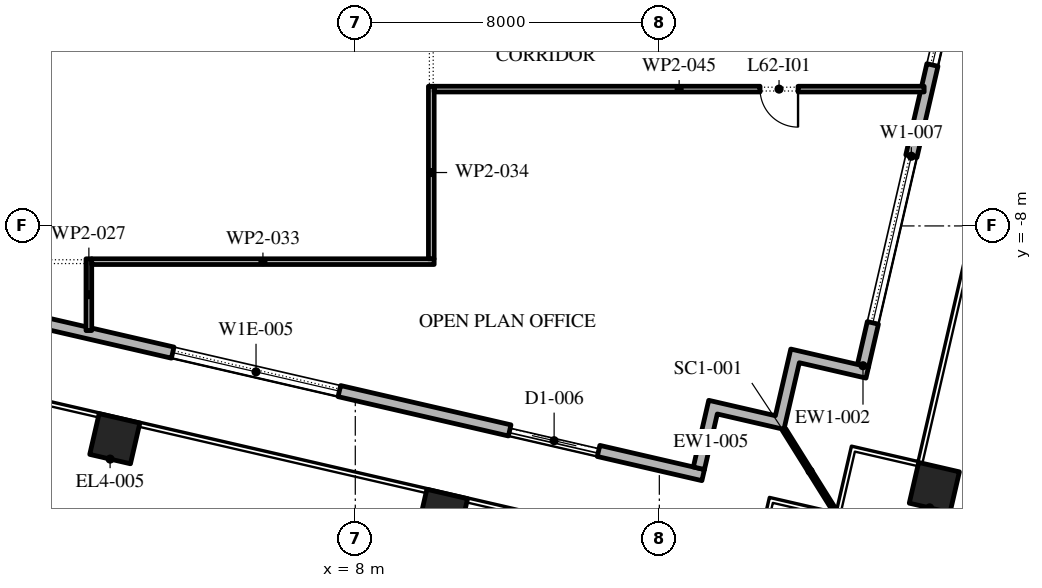
"""IFC4 building model, lengths in metres.
Left out: names, types, materials, properties, quantities, classifications, styles, units other than length and angle.
Written with IfcOpenShell. Run it as: python <this file> out.ifc"""

import sys

from ifc_helpers import new_model, si_unit, direction, frame, frame_2d, origin, origin_2d, place, context, subcontext, project, spatial, polyline, rectangle, outline, extrude, element, fill, save


model = new_model("IFC4")
c1 = context("Model", 3, precision=1e-05, world=origin(), true_north=direction((0.0, 1.0)))
c2 = subcontext(c1, "Body", "Model", "MODEL_VIEW")
j1 = project(units=[si_unit("LENGTHUNIT", "METRE"), si_unit("PLANEANGLEUNIT", "RADIAN")], contexts=[c1])
p1 = place(None, origin())
s1 = spatial("IfcSite", under=j1, at=p1, CompositionType="ELEMENT")
p2 = place(p1, origin())
s2 = spatial("IfcBuilding", under=s1, at=p2, CompositionType="ELEMENT")
p3 = place(p2, frame((0.0, 0.0, 285.0)))
s3 = spatial("IfcBuildingStorey", under=s2, at=p3, CompositionType="ELEMENT", Elevation=285.0)
for number, where, z_axis, x_axis in (
    (1, (1.672, -13.599, 0.0), (0.0, 0.0, 1.0), (0.974, -0.225, 0.0)),
    (2, (10.295, -15.59, 0.0), (0.0, 0.0, 1.0), (0.974, -0.225, 0.0)),
    (3, (23.236, -14.883, 0.0), (0.0, 0.0, 1.0), (0.974, -0.225, 0.0)),
):
    element("IfcColumn", number, at=place(p3, frame(where, z_axis=z_axis, x_axis=x_axis)), inside=s3, PredefinedType="COLUMN", context=c2, shape_type="SweptSolid", body=[
        extrude(rectangle(XDim=1.1, YDim=1.1, at=origin_2d()), origin(), (0.0, 0.0, 1.0), 4.2),
    ])
p4 = place(p3, frame((-29.616, -3.758, 0.0), z_axis=(0.0, 0.0, 1.0), x_axis=(0.974370532314, -0.224949029246, 0.0)))
e4 = element("IfcWall", 4, at=p4, inside=s3, PredefinedType="STANDARD", context=c2, shape_type="SweptSolid", body=[
    extrude(rectangle(XDim=48.0, YDim=0.3, at=frame_2d((24.0, 0.0))), origin(), (0.0, 0.0, 1.0), 4.0),
])
p5 = place(p4, frame((1.625, 0.0, 0.45)))
e5 = element("IfcOpeningElement", 5, at=p5, cuts=e4, PredefinedType="OPENING", context=c2, shape_type="SweptSolid", body=[
    extrude(rectangle(XDim=4.5, YDim=3.05, at=frame_2d((2.25, 1.525))), frame((0.0, 0.16, 0.0), z_axis=(0.0, -1.0, 0.0), x_axis=(1.0, 0.0, 0.0)), (0.0, 0.0, 1.0), 0.32),
])
p6 = place(p4, frame((10.575, 0.0, 0.0)))
e6 = element("IfcOpeningElement", 6, at=p6, cuts=e4, PredefinedType="OPENING", context=c2, shape_type="SweptSolid", body=[
    extrude(rectangle(XDim=2.4, YDim=3.5, at=frame_2d((1.2, 1.75))), frame((0.0, 0.16, 0.0), z_axis=(0.0, -1.0, 0.0), x_axis=(1.0, 0.0, 0.0)), (0.0, 0.0, 1.0), 0.32),
])
p7 = place(p4, frame((17.575, 0.0, 0.45)))
e7 = element("IfcOpeningElement", 7, at=p7, cuts=e4, PredefinedType="OPENING", context=c2, shape_type="SweptSolid", body=[
    extrude(rectangle(XDim=4.5, YDim=3.0, at=frame_2d((2.25, 1.5))), frame((0.0, 0.16, 0.0), z_axis=(0.0, -1.0, 0.0), x_axis=(1.0, 0.0, 0.0)), (0.0, 0.0, 1.0), 0.32),
])
p8 = place(p4, frame((25.625, 0.0, 0.45)))
e8 = element("IfcOpeningElement", 8, at=p8, cuts=e4, PredefinedType="OPENING", context=c2, shape_type="SweptSolid", body=[
    extrude(rectangle(XDim=4.5, YDim=2.95, at=frame_2d((2.25, 1.475))), frame((0.0, 0.16, 0.0), z_axis=(0.0, -1.0, 0.0), x_axis=(1.0, 0.0, 0.0)), (0.0, 0.0, 1.0), 0.32),
])
p9 = place(p4, frame((33.675, 0.0, 0.45)))
e9 = element("IfcOpeningElement", 9, at=p9, cuts=e4, PredefinedType="OPENING", context=c2, shape_type="SweptSolid", body=[
    extrude(rectangle(XDim=4.5, YDim=2.825, at=frame_2d((2.25, 1.413))), frame((0.0, 0.16, 0.0), z_axis=(0.0, -1.0, 0.0), x_axis=(1.0, 0.0, 0.0)), (0.0, 0.0, 1.0), 0.32),
])
p10 = place(p4, frame((42.775, 0.0, 0.0)))
e10 = element("IfcOpeningElement", 10, at=p10, cuts=e4, PredefinedType="OPENING", context=c2, shape_type="SweptSolid", body=[
    extrude(rectangle(XDim=2.4, YDim=3.5, at=frame_2d((1.2, 1.75))), frame((0.0, 0.16, 0.0), z_axis=(0.0, -1.0, 0.0), x_axis=(1.0, 0.0, 0.0)), (0.0, 0.0, 1.0), 0.32),
])
p11 = place(p3, frame((21.359, -11.678, 0.0), z_axis=(0.0, 0.0, 1.0), x_axis=(0.224949198343, 0.974370493275, 0.0)))
e11 = element("IfcWall", 11, at=p11, inside=s3, PredefinedType="STANDARD", context=c2, shape_type="SweptSolid", body=[
    extrude(rectangle(XDim=49.5, YDim=0.3, at=frame_2d((24.75, 0.0))), origin(), (0.0, 0.0, 1.0), 4.0),
])
p12 = place(p11, frame((1.157, 0.0, 0.45)))
e12 = element("IfcOpeningElement", 12, at=p12, cuts=e11, PredefinedType="OPENING", context=c2, shape_type="SweptSolid", body=[
    extrude(rectangle(XDim=4.5, YDim=3.05, at=frame_2d((2.25, 1.525))), frame((0.0, 0.16, 0.0), z_axis=(0.0, -1.0, 0.0), x_axis=(1.0, 0.0, 0.0)), (0.0, 0.0, 1.0), 0.32),
])
p13 = place(p11, frame((8.121, 0.0, 0.45)))
e13 = element("IfcOpeningElement", 13, at=p13, cuts=e11, PredefinedType="OPENING", context=c2, shape_type="SweptSolid", body=[
    extrude(rectangle(XDim=4.5, YDim=3.05, at=frame_2d((2.25, 1.525))), frame((0.0, 0.16, 0.0), z_axis=(0.0, -1.0, 0.0), x_axis=(1.0, 0.0, 0.0)), (0.0, 0.0, 1.0), 0.32),
])
p14 = place(p11, frame((15.236, 0.0, 0.45)))
e14 = element("IfcOpeningElement", 14, at=p14, cuts=e11, PredefinedType="OPENING", context=c2, shape_type="SweptSolid", body=[
    extrude(rectangle(XDim=4.5, YDim=3.05, at=frame_2d((2.25, 1.525))), frame((0.0, 0.16, 0.0), z_axis=(0.0, -1.0, 0.0), x_axis=(1.0, 0.0, 0.0)), (0.0, 0.0, 1.0), 0.32),
])
p15 = place(p11, frame((22.35, 0.0, 0.45)))
e15 = element("IfcOpeningElement", 15, at=p15, cuts=e11, PredefinedType="OPENING", context=c2, shape_type="SweptSolid", body=[
    extrude(rectangle(XDim=4.5, YDim=3.05, at=frame_2d((2.25, 1.525))), frame((0.0, 0.16, 0.0), z_axis=(0.0, -1.0, 0.0), x_axis=(1.0, 0.0, 0.0)), (0.0, 0.0, 1.0), 0.32),
])
p16 = place(p11, frame((29.464, 0.0, 0.45)))
e16 = element("IfcOpeningElement", 16, at=p16, cuts=e11, PredefinedType="OPENING", context=c2, shape_type="SweptSolid", body=[
    extrude(rectangle(XDim=4.5, YDim=2.95, at=frame_2d((2.25, 1.475))), frame((0.0, 0.16, 0.0), z_axis=(0.0, -1.0, 0.0), x_axis=(1.0, 0.0, 0.0)), (0.0, 0.0, 1.0), 0.32),
])
p17 = place(p11, frame((37.628, 0.0, 0.0)))
e17 = element("IfcOpeningElement", 17, at=p17, cuts=e11, PredefinedType="OPENING", context=c2, shape_type="SweptSolid", body=[
    extrude(rectangle(XDim=2.4, YDim=3.325, at=frame_2d((1.2, 1.663))), frame((0.0, 0.16, 0.0), z_axis=(0.0, -1.0, 0.0), x_axis=(1.0, 0.0, 0.0)), (0.0, 0.0, 1.0), 0.32),
])
p18 = place(p11, frame((43.693, 0.0, 0.45)))
e18 = element("IfcOpeningElement", 18, at=p18, cuts=e11, PredefinedType="OPENING", context=c2, shape_type="SweptSolid", body=[
    extrude(rectangle(XDim=4.5, YDim=3.05, at=frame_2d((2.25, 1.525))), frame((0.0, 0.16, 0.0), z_axis=(0.0, -1.0, 0.0), x_axis=(1.0, 0.0, 0.0)), (0.0, 0.0, 1.0), 0.32),
])
p19 = place(p3, origin())
e19 = element("IfcWall", 19, at=p19, inside=s3, PredefinedType="STANDARD", context=c2, shape_type="SweptSolid", body=[
    extrude(outline(polyline([(19.054, -12.993), (19.459, -11.24), (21.505, -11.712), (21.438, -12.004), (19.684, -11.599), (19.279, -13.353), (17.525, -12.948), (17.188, -14.41), (16.895, -14.342), (17.3, -12.588), (19.054, -12.993)])), origin(), (0.0, 0.0, 1.0), 4.0),
])
p20 = place(p3, frame((19.279, -13.353, -0.05), z_axis=(0.0, 0.0, 1.0), x_axis=(0.529914407191, -0.848051131154, 0.0)))
e20 = element("IfcWall", 20, at=p20, inside=s3, PredefinedType="STANDARD", context=c2, shape_type="SweptSolid", body=[
    extrude(rectangle(XDim=2.596, YDim=0.1, at=frame_2d((1.298, 0.0))), origin(), (0.0, 0.0, 1.0), 4.05),
])
p21 = place(p3, frame((0.99, -8.865, 0.0), z_axis=(0.0, 0.0, 1.0), x_axis=(0.0, -1.0, 0.0)))
e21 = element("IfcWall", 21, at=p21, inside=s3, PredefinedType="PARTITIONING", context=c2, shape_type="SweptSolid", body=[
    extrude(rectangle(XDim=1.888, YDim=0.15, at=frame_2d((0.944, 0.0))), origin(), (0.0, 0.0, 1.0), 4.0),
])
p22 = place(p3, frame((10.075, -8.94, 0.0), z_axis=(0.0, 0.0, 1.0), x_axis=(-1.0, 0.0, 0.0)))
e22 = element("IfcWall", 22, at=p22, inside=s3, PredefinedType="PARTITIONING", context=c2, shape_type="SweptSolid", body=[
    extrude(rectangle(XDim=9.01, YDim=0.15, at=frame_2d((4.505, 0.0))), origin(), (0.0, 0.0, 1.0), 4.0),
])
p23 = place(p3, frame((10.0, -4.325, 0.0), z_axis=(0.0, 0.0, 1.0), x_axis=(0.0, -1.0, 0.0)))
e23 = element("IfcWall", 23, at=p23, inside=s3, PredefinedType="PARTITIONING", context=c2, shape_type="SweptSolid", body=[
    extrude(rectangle(XDim=4.54, YDim=0.15, at=frame_2d((2.27, 0.0))), origin(), (0.0, 0.0, 1.0), 4.0),
])
p24 = place(p3, frame((22.968, -4.4, 0.0), z_axis=(0.0, 0.0, 1.0), x_axis=(-1.0, 0.0, 0.0)))
e24 = element("IfcWall", 24, at=p24, inside=s3, PredefinedType="PARTITIONING", context=c2, shape_type="SweptSolid", body=[
    extrude(rectangle(XDim=12.893, YDim=0.15, at=frame_2d((6.447, 0.0))), origin(), (0.0, 0.0, 1.0), 4.0),
])
p25 = place(p24, frame((3.318, 0.0, 0.0)))
e25 = element("IfcOpeningElement", 25, at=p25, cuts=e24, PredefinedType="OPENING", context=c2, shape_type="SweptSolid", body=[
    extrude(rectangle(XDim=1.0, YDim=2.1, at=frame_2d((0.5, 1.05))), frame((0.0, 0.085, 0.0), z_axis=(0.0, -1.0, 0.0), x_axis=(1.0, 0.0, 0.0)), (0.0, 0.0, 1.0), 0.17),
])
p26 = place(p9, origin())
e26 = element("IfcWindow", 26, at=p26, inside=s3, PartitioningType="DOUBLE_PANEL_VERTICAL", PredefinedType="WINDOW", context=c2, shape_type="SweptSolid", body=[
    extrude(rectangle(XDim=4.5, YDim=2.825, at=frame_2d((2.25, 1.413))), frame((0.0, 0.03, 0.0), z_axis=(0.0, -1.0, 0.0), x_axis=(1.0, 0.0, 0.0)), (0.0, 0.0, 1.0), 0.06),
])
fill(e9, e26)
p27 = place(p10, origin())
e27 = element("IfcDoor", 27, at=p27, inside=s3, OperationType="DOUBLE_DOOR_SLIDING", PredefinedType="DOOR", context=c2, shape_type="SweptSolid", body=[
    extrude(rectangle(XDim=2.4, YDim=3.5, at=frame_2d((1.2, 1.75))), frame((0.0, 0.025, 0.0), z_axis=(0.0, -1.0, 0.0), x_axis=(1.0, 0.0, 0.0)), (0.0, 0.0, 1.0), 0.05),
])
fill(e10, e27)
p28 = place(p12, origin())
e28 = element("IfcWindow", 28, at=p28, inside=s3, PartitioningType="DOUBLE_PANEL_VERTICAL", PredefinedType="WINDOW", context=c2, shape_type="SweptSolid", body=[
    extrude(rectangle(XDim=4.5, YDim=3.05, at=frame_2d((2.25, 1.525))), frame((0.0, 0.03, 0.0), z_axis=(0.0, -1.0, 0.0), x_axis=(1.0, 0.0, 0.0)), (0.0, 0.0, 1.0), 0.06),
])
fill(e12, e28)
p29 = place(p13, origin())
e29 = element("IfcWindow", 29, at=p29, inside=s3, PartitioningType="DOUBLE_PANEL_VERTICAL", PredefinedType="WINDOW", context=c2, shape_type="SweptSolid", body=[
    extrude(rectangle(XDim=4.5, YDim=3.05, at=frame_2d((2.25, 1.525))), frame((0.0, 0.03, 0.0), z_axis=(0.0, -1.0, 0.0), x_axis=(1.0, 0.0, 0.0)), (0.0, 0.0, 1.0), 0.06),
])
fill(e13, e29)
p30 = place(p25, origin())
e30 = element("IfcDoor", 30, at=p30, inside=s3, OperationType="SINGLE_SWING_RIGHT", PredefinedType="DOOR", context=c2, shape_type="SweptSolid", body=[
    extrude(rectangle(XDim=1.0, YDim=2.1, at=frame_2d((0.5, 1.05))), frame((0.0, 0.025, 0.0), z_axis=(0.0, -1.0, 0.0), x_axis=(1.0, 0.0, 0.0)), (0.0, 0.0, 1.0), 0.05),
])
fill(e25, e30)
save(model, sys.argv[1])
